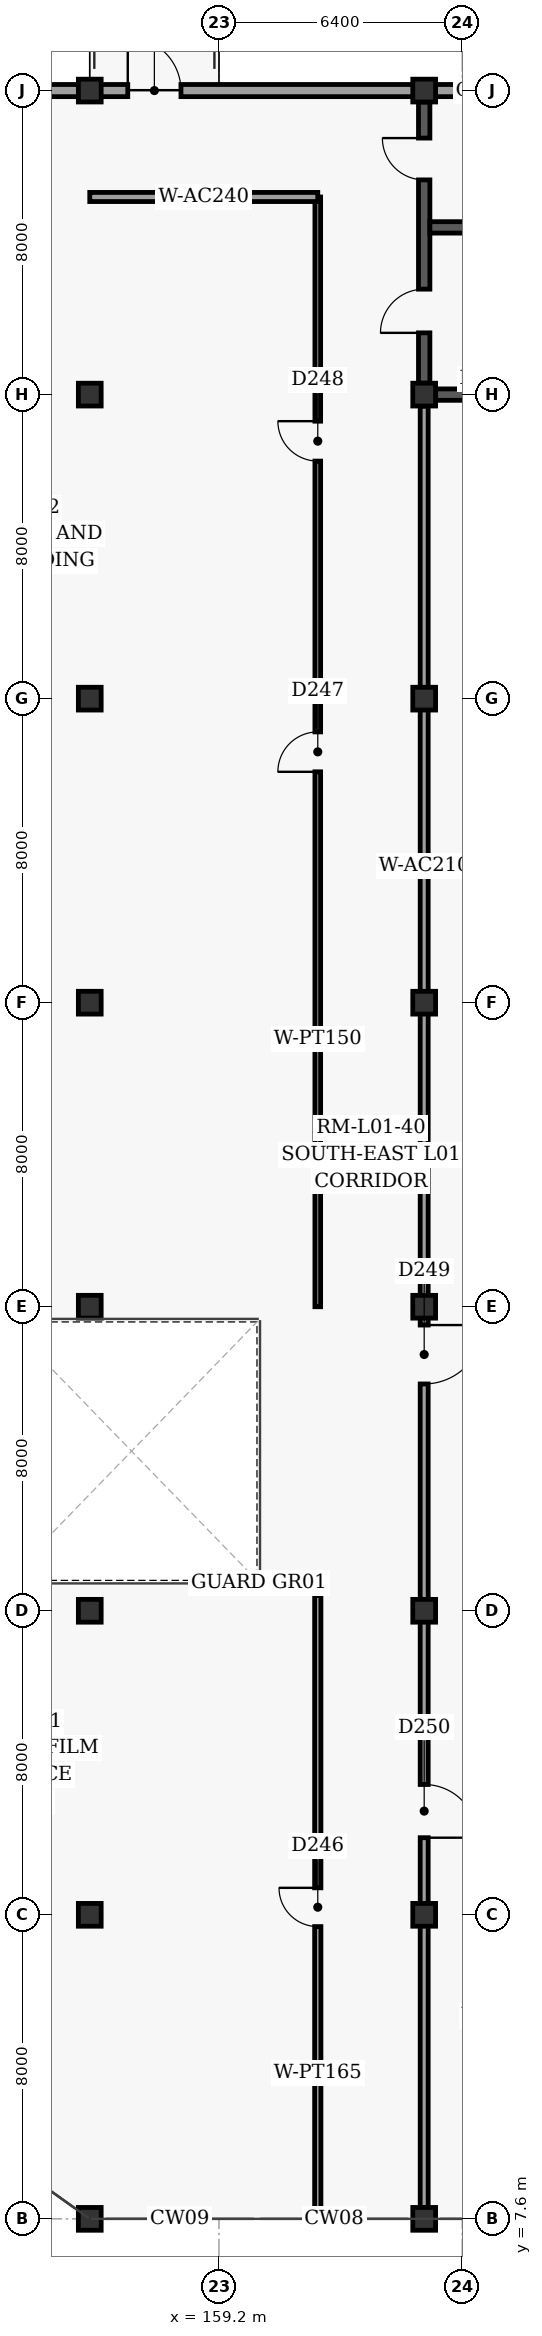
"""IFC4 building model, lengths in metres.
Left out: names, types, materials, properties, quantities, classifications, styles, units other than length and angle.
Written with IfcOpenShell. Run it as: python <this file> out.ifc"""

import sys

from ifc_helpers import new_model, si_unit, direction, frame, frame_2d, origin, origin_2d, place, context, subcontext, project, spatial, rectangle, extrude, element, fill, save


model = new_model("IFC4")
c1 = context("Model", 3, precision=1e-05, world=origin(), true_north=direction((0.0, 1.0)))
c2 = subcontext(c1, "Body", "Model", "MODEL_VIEW")
j1 = project(units=[si_unit("LENGTHUNIT", "METRE"), si_unit("PLANEANGLEUNIT", "RADIAN")], contexts=[c1])
p1 = place(None, origin())
s1 = spatial("IfcSite", under=j1, at=p1, CompositionType="ELEMENT")
p2 = place(p1, origin())
s2 = spatial("IfcBuilding", under=s1, at=p2, CompositionType="ELEMENT")
p3 = place(p2, frame((0.0, 0.0, 5.4)))
s3 = spatial("IfcBuildingStorey", under=s2, at=p3, CompositionType="ELEMENT", Elevation=5.4)
for number, where, z_axis, x_axis in (
    (1, (155.8, 7.6, 0.0), (0.0, 0.0, 1.0), (1.0, 0.0, 0.0)),
    (2, (155.8, 15.6, 0.0), (0.0, 0.0, 1.0), (1.0, 0.0, 0.0)),
    (3, (155.8, 23.6, 0.0), (0.0, 0.0, 1.0), (1.0, 0.0, 0.0)),
    (4, (155.8, 31.6, 0.0), (0.0, 0.0, 1.0), (1.0, 0.0, 0.0)),
    (5, (155.8, 39.6, 0.0), (0.0, 0.0, 1.0), (1.0, 0.0, 0.0)),
    (6, (155.8, 47.6, 0.0), (0.0, 0.0, 1.0), (1.0, 0.0, 0.0)),
    (7, (155.8, 55.6, 0.0), (0.0, 0.0, 1.0), (1.0, 0.0, 0.0)),
    (8, (155.8, 63.6, 0.0), (0.0, 0.0, 1.0), (1.0, 0.0, 0.0)),
    (9, (164.6, 7.6, 0.0), (0.0, 0.0, 1.0), (1.0, 0.0, 0.0)),
    (10, (164.6, 15.6, 0.0), (0.0, 0.0, 1.0), (1.0, 0.0, 0.0)),
    (11, (164.6, 23.6, 0.0), (0.0, 0.0, 1.0), (1.0, 0.0, 0.0)),
    (12, (164.6, 31.6, 0.0), (0.0, 0.0, 1.0), (1.0, 0.0, 0.0)),
    (13, (164.6, 39.6, 0.0), (0.0, 0.0, 1.0), (1.0, 0.0, 0.0)),
    (14, (164.6, 47.6, 0.0), (0.0, 0.0, 1.0), (1.0, 0.0, 0.0)),
    (15, (164.6, 55.6, 0.0), (0.0, 0.0, 1.0), (1.0, 0.0, 0.0)),
    (16, (164.6, 63.6, 0.0), (0.0, 0.0, 1.0), (1.0, 0.0, 0.0)),
):
    element("IfcColumn", number, at=place(p3, frame(where, z_axis=z_axis, x_axis=x_axis)), inside=s3, PredefinedType="COLUMN", context=c2, shape_type="SweptSolid", body=[
        extrude(rectangle(XDim=0.6, YDim=0.6, at=origin_2d()), origin(), (0.0, 0.0, 1.0), 4.8),
    ])
p4 = place(p3, frame((149.2, 63.6, 0.0), z_axis=(0.0, 0.0, 1.0), x_axis=(1.0, 0.0, 0.0)))
e17 = element("IfcWall", 17, at=p4, inside=s3, PredefinedType="SOLIDWALL", context=c2, shape_type="SweptSolid", body=[
    extrude(rectangle(XDim=22.8, YDim=0.32, at=frame_2d((11.4, 0.0))), origin(), (0.0, 0.0, 1.0), 3.67),
])
p5 = place(p4, frame((2.2, 0.0, 0.9)))
e18 = element("IfcOpeningElement", 18, at=p5, cuts=e17, PredefinedType="OPENING", context=c2, shape_type="SweptSolid", body=[
    extrude(rectangle(XDim=2.2, YDim=1.7, at=frame_2d((1.1, 0.85))), frame((0.0, 0.17, 0.0), z_axis=(0.0, -1.0, 0.0), x_axis=(1.0, 0.0, 0.0)), (0.0, 0.0, 1.0), 0.34),
])
p6 = place(p4, frame((7.6, 0.0, 0.0)))
e19 = element("IfcOpeningElement", 19, at=p6, cuts=e17, PredefinedType="OPENING", context=c2, shape_type="SweptSolid", body=[
    extrude(rectangle(XDim=1.4, YDim=2.25, at=frame_2d((0.7, 1.125))), frame((0.0, 0.17, 0.0), z_axis=(0.0, -1.0, 0.0), x_axis=(1.0, 0.0, 0.0)), (0.0, 0.0, 1.0), 0.34),
])
p7 = place(p3, frame((164.902, 55.6, 0.0), z_axis=(0.0, 0.0, 1.0), x_axis=(1.0, 0.0, 0.0)))
e20 = element("IfcWall", 20, at=p7, inside=s3, PredefinedType="SHEAR", context=c2, shape_type="SweptSolid", body=[
    extrude(rectangle(XDim=6.796, YDim=0.3, at=frame_2d((3.398, 0.0))), origin(), (0.0, 0.0, 1.0), 4.52),
])
p8 = place(p3, frame((164.6, 55.902, 0.0), z_axis=(0.0, 0.0, 1.0), x_axis=(0.0, 1.0, 0.0)))
e21 = element("IfcWall", 21, at=p8, inside=s3, PredefinedType="SHEAR", context=c2, shape_type="SweptSolid", body=[
    extrude(rectangle(XDim=7.396, YDim=0.3, at=frame_2d((3.698, 0.0))), origin(), (0.0, 0.0, 1.0), 4.52),
])
p9 = place(p8, frame((5.348, 0.0, 0.0)))
e22 = element("IfcOpeningElement", 22, at=p9, cuts=e21, PredefinedType="OPENING", context=c2, shape_type="SweptSolid", body=[
    extrude(rectangle(XDim=1.1, YDim=2.15, at=frame_2d((0.55, 1.075))), frame((0.0, 0.16, 0.0), z_axis=(0.0, -1.0, 0.0), x_axis=(1.0, 0.0, 0.0)), (0.0, 0.0, 1.0), 0.32),
])
p10 = place(p8, frame((1.323, 0.0, 0.0)))
e23 = element("IfcOpeningElement", 23, at=p10, cuts=e21, PredefinedType="OPENING", context=c2, shape_type="SweptSolid", body=[
    extrude(rectangle(XDim=1.15, YDim=2.2, at=frame_2d((0.575, 1.1))), frame((0.0, 0.16, 0.0), z_axis=(0.0, -1.0, 0.0), x_axis=(1.0, 0.0, 0.0)), (0.0, 0.0, 1.0), 0.32),
])
p11 = place(p3, frame((164.75, 60.0, 0.0), z_axis=(0.0, 0.0, 1.0), x_axis=(1.0, 0.0, 0.0)))
e24 = element("IfcWall", 24, at=p11, inside=s3, PredefinedType="SHEAR", context=c2, shape_type="SweptSolid", body=[
    extrude(rectangle(XDim=7.1, YDim=0.3, at=frame_2d((3.55, 0.0))), origin(), (0.0, 0.0, 1.0), 4.52),
])
p12 = place(p3, frame((161.8, 7.6, 0.0), z_axis=(0.0, 0.0, 1.0), x_axis=(0.0, 1.0, 0.0)))
e25 = element("IfcWall", 25, at=p12, inside=s3, PredefinedType="PARTITIONING", context=c2, shape_type="SweptSolid", body=[
    extrude(rectangle(XDim=16.4, YDim=0.165, at=frame_2d((8.2, 0.0))), origin(), (0.0, 0.0, 1.0), 4.52),
])
p13 = place(p12, frame((7.69, 0.0, 0.0)))
e26 = element("IfcOpeningElement", 26, at=p13, cuts=e25, PredefinedType="OPENING", context=c2, shape_type="SweptSolid", body=[
    extrude(rectangle(XDim=1.02, YDim=2.1, at=frame_2d((0.51, 1.05))), frame((0.0, 0.093, 0.0), z_axis=(0.0, -1.0, 0.0), x_axis=(1.0, 0.0, 0.0)), (0.0, 0.0, 1.0), 0.185),
])
p14 = place(p3, frame((161.8, 31.6, 0.0), z_axis=(0.0, 0.0, 1.0), x_axis=(0.0, 1.0, 0.0)))
e27 = element("IfcWall", 27, at=p14, inside=s3, PredefinedType="PARTITIONING", context=c2, shape_type="SweptSolid", body=[
    extrude(rectangle(XDim=29.2, YDim=0.15, at=frame_2d((14.6, 0.0))), origin(), (0.0, 0.0, 1.0), 4.52),
])
p15 = place(p14, frame((14.075, 0.0, 0.0)))
e28 = element("IfcOpeningElement", 28, at=p15, cuts=e27, PredefinedType="OPENING", context=c2, shape_type="SweptSolid", body=[
    extrude(rectangle(XDim=1.05, YDim=2.15, at=frame_2d((0.525, 1.075))), frame((0.0, 0.085, 0.0), z_axis=(0.0, -1.0, 0.0), x_axis=(1.0, 0.0, 0.0)), (0.0, 0.0, 1.0), 0.17),
])
p16 = place(p14, frame((22.251, 0.0, 0.0)))
e29 = element("IfcOpeningElement", 29, at=p16, cuts=e27, PredefinedType="OPENING", context=c2, shape_type="SweptSolid", body=[
    extrude(rectangle(XDim=1.05, YDim=2.15, at=frame_2d((0.525, 1.075))), frame((0.0, 0.085, 0.0), z_axis=(0.0, -1.0, 0.0), x_axis=(1.0, 0.0, 0.0)), (0.0, 0.0, 1.0), 0.17),
])
p17 = place(p3, frame((161.8, 60.8, 0.0), z_axis=(0.0, 0.0, 1.0), x_axis=(-1.0, 0.0, 0.0)))
e30 = element("IfcWall", 30, at=p17, inside=s3, PredefinedType="PARTITIONING", context=c2, shape_type="SweptSolid", body=[
    extrude(rectangle(XDim=6.0, YDim=0.24, at=frame_2d((3.0, 0.0))), origin(), (0.0, 0.0, 1.0), 4.52),
])
p18 = place(p3, frame((164.6, 55.298, 0.0), z_axis=(0.0, 0.0, 1.0), x_axis=(0.0, -1.0, 0.0)))
e31 = element("IfcWall", 31, at=p18, inside=s3, PredefinedType="PARTITIONING", context=c2, shape_type="SweptSolid", body=[
    extrude(rectangle(XDim=47.396, YDim=0.21, at=frame_2d((23.698, 0.0))), origin(), (0.0, 0.0, 1.0), 3.67),
])
p19 = place(p18, frame((24.18, 0.0, 0.0)))
e32 = element("IfcOpeningElement", 32, at=p19, cuts=e31, PredefinedType="OPENING", context=c2, shape_type="SweptSolid", body=[
    extrude(rectangle(XDim=1.55, YDim=2.25, at=frame_2d((0.775, 1.125))), frame((0.0, 0.115, 0.0), z_axis=(0.0, -1.0, 0.0), x_axis=(1.0, 0.0, 0.0)), (0.0, 0.0, 1.0), 0.23),
])
p20 = place(p18, frame((36.269, 0.0, 0.0)))
e33 = element("IfcOpeningElement", 33, at=p20, cuts=e31, PredefinedType="OPENING", context=c2, shape_type="SweptSolid", body=[
    extrude(rectangle(XDim=1.4, YDim=2.25, at=frame_2d((0.7, 1.125))), frame((0.0, 0.115, 0.0), z_axis=(0.0, -1.0, 0.0), x_axis=(1.0, 0.0, 0.0)), (0.0, 0.0, 1.0), 0.23),
])
p21 = place(p9, origin())
e34 = element("IfcDoor", 34, at=p21, inside=s3, OperationType="SINGLE_SWING_RIGHT", PredefinedType="DOOR", context=c2, shape_type="SweptSolid", body=[
    extrude(rectangle(XDim=1.1, YDim=2.15, at=frame_2d((0.55, 1.075))), frame((0.0, 0.025, 0.0), z_axis=(0.0, -1.0, 0.0), x_axis=(1.0, 0.0, 0.0)), (0.0, 0.0, 1.0), 0.05),
])
fill(e22, e34)
p22 = place(p10, origin())
e35 = element("IfcDoor", 35, at=p22, inside=s3, OperationType="SINGLE_SWING_LEFT", PredefinedType="DOOR", context=c2, shape_type="SweptSolid", body=[
    extrude(rectangle(XDim=1.15, YDim=2.2, at=frame_2d((0.575, 1.1))), frame((0.0, 0.025, 0.0), z_axis=(0.0, -1.0, 0.0), x_axis=(1.0, 0.0, 0.0)), (0.0, 0.0, 1.0), 0.05),
])
fill(e23, e35)
p23 = place(p6, origin())
e36 = element("IfcDoor", 36, at=p23, inside=s3, OperationType="SINGLE_SWING_LEFT", PredefinedType="DOOR", context=c2, shape_type="SweptSolid", body=[
    extrude(rectangle(XDim=1.4, YDim=2.25, at=frame_2d((0.7, 1.125))), frame((0.0, 0.025, 0.0), z_axis=(0.0, -1.0, 0.0), x_axis=(1.0, 0.0, 0.0)), (0.0, 0.0, 1.0), 0.05),
])
fill(e19, e36)
p24 = place(p13, origin())
e37 = element("IfcDoor", 37, at=p24, inside=s3, OperationType="SINGLE_SWING_RIGHT", PredefinedType="DOOR", context=c2, shape_type="SweptSolid", body=[
    extrude(rectangle(XDim=1.02, YDim=2.1, at=frame_2d((0.51, 1.05))), frame((0.0, 0.025, 0.0), z_axis=(0.0, -1.0, 0.0), x_axis=(1.0, 0.0, 0.0)), (0.0, 0.0, 1.0), 0.05),
])
fill(e26, e37)
p25 = place(p15, origin())
e38 = element("IfcDoor", 38, at=p25, inside=s3, OperationType="SINGLE_SWING_LEFT", PredefinedType="DOOR", context=c2, shape_type="SweptSolid", body=[
    extrude(rectangle(XDim=1.05, YDim=2.15, at=frame_2d((0.525, 1.075))), frame((0.0, 0.025, 0.0), z_axis=(0.0, -1.0, 0.0), x_axis=(1.0, 0.0, 0.0)), (0.0, 0.0, 1.0), 0.05),
])
fill(e28, e38)
p26 = place(p16, origin())
e39 = element("IfcDoor", 39, at=p26, inside=s3, OperationType="SINGLE_SWING_RIGHT", PredefinedType="DOOR", context=c2, shape_type="SweptSolid", body=[
    extrude(rectangle(XDim=1.05, YDim=2.15, at=frame_2d((0.525, 1.075))), frame((0.0, 0.025, 0.0), z_axis=(0.0, -1.0, 0.0), x_axis=(1.0, 0.0, 0.0)), (0.0, 0.0, 1.0), 0.05),
])
fill(e29, e39)
p27 = place(p19, origin())
e40 = element("IfcDoor", 40, at=p27, inside=s3, OperationType="SINGLE_SWING_LEFT", PredefinedType="DOOR", context=c2, shape_type="SweptSolid", body=[
    extrude(rectangle(XDim=1.55, YDim=2.25, at=frame_2d((0.775, 1.125))), frame((0.0, 0.025, 0.0), z_axis=(0.0, -1.0, 0.0), x_axis=(1.0, 0.0, 0.0)), (0.0, 0.0, 1.0), 0.05),
])
fill(e32, e40)
p28 = place(p20, origin())
e41 = element("IfcDoor", 41, at=p28, inside=s3, OperationType="SINGLE_SWING_RIGHT", PredefinedType="DOOR", context=c2, shape_type="SweptSolid", body=[
    extrude(rectangle(XDim=1.4, YDim=2.25, at=frame_2d((0.7, 1.125))), frame((0.0, 0.025, 0.0), z_axis=(0.0, -1.0, 0.0), x_axis=(1.0, 0.0, 0.0)), (0.0, 0.0, 1.0), 0.05),
])
fill(e33, e41)
save(model, sys.argv[1])
